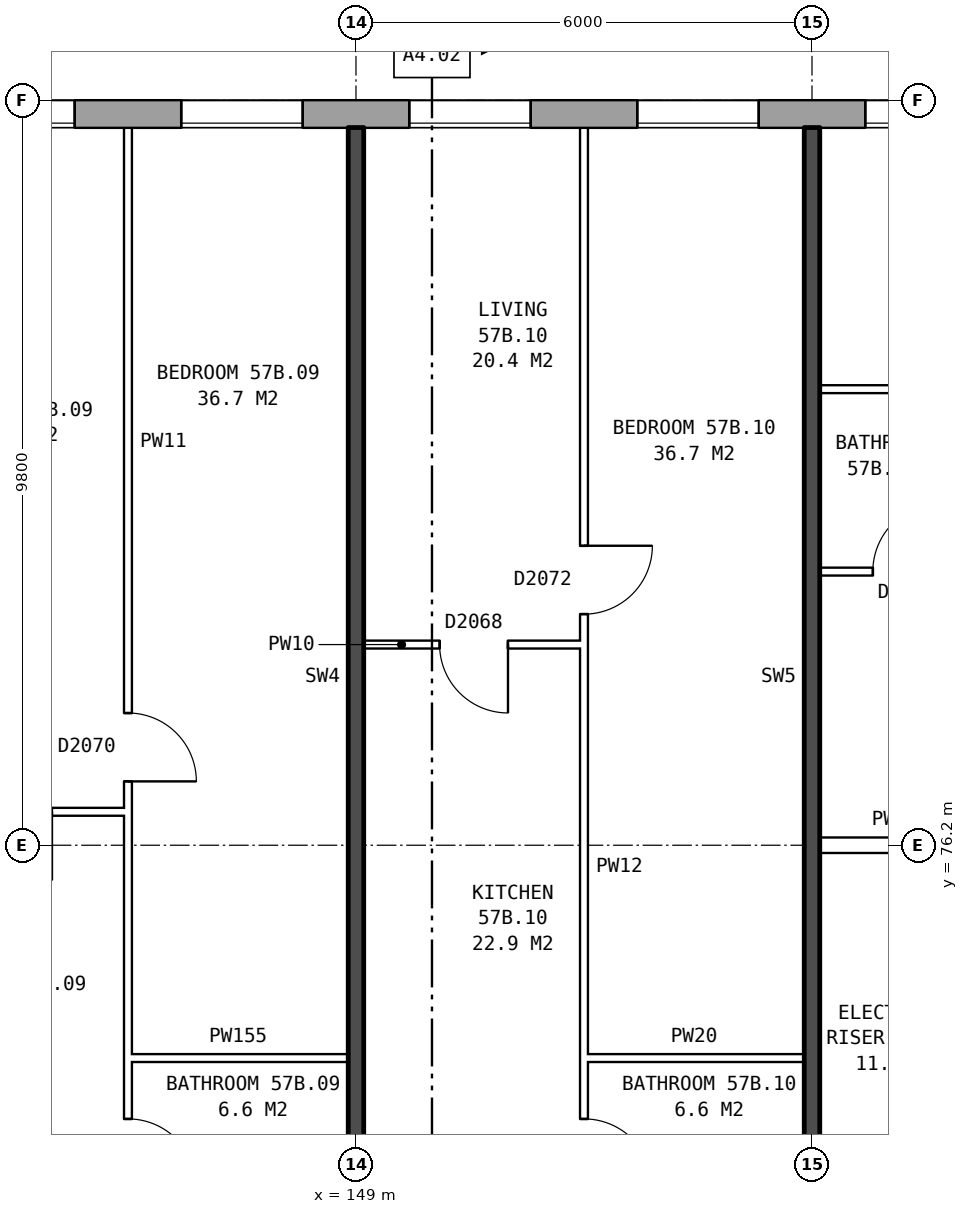
"""IFC4 building model, lengths in metres.
Left out: names, types, materials, properties, quantities, classifications, styles, units other than length and angle.
Written with IfcOpenShell. Run it as: python <this file> out.ifc"""

import sys

from ifc_helpers import new_model, si_unit, direction, frame, frame_2d, origin, place, context, subcontext, project, spatial, rectangle, extrude, element, fill, save


model = new_model("IFC4")
c1 = context("Model", 3, precision=1e-05, world=origin(), true_north=direction((0.0, 1.0)))
c2 = subcontext(c1, "Body", "Model", "MODEL_VIEW")
j1 = project(units=[si_unit("LENGTHUNIT", "METRE"), si_unit("PLANEANGLEUNIT", "RADIAN")], contexts=[c1])
p1 = place(None, origin())
s1 = spatial("IfcSite", under=j1, at=p1, CompositionType="ELEMENT")
p2 = place(p1, origin())
s2 = spatial("IfcBuilding", under=s1, at=p2, CompositionType="ELEMENT")
p3 = place(p2, frame((0.0, 0.0, 202.8)))
s3 = spatial("IfcBuildingStorey", under=s2, at=p3, CompositionType="ELEMENT", Elevation=202.8)
p4 = place(p3, frame((165.925, 85.82, 0.0), z_axis=(0.0, 0.0, 1.0), x_axis=(-1.0, 0.0, 0.0)))
e1 = element("IfcWall", 1, at=p4, inside=s3, PredefinedType="STANDARD", context=c2, shape_type="SweptSolid", body=[
    extrude(rectangle(XDim=33.875, YDim=0.36, at=frame_2d((16.938, 0.0))), origin(), (0.0, 0.0, 1.0), 2.85),
])
p5 = place(p4, frame((2.625, 0.0, 0.8)))
e2 = element("IfcOpeningElement", 2, at=p5, cuts=e1, PredefinedType="OPENING", context=c2, shape_type="SweptSolid", body=[
    extrude(rectangle(XDim=1.6, YDim=1.8, at=frame_2d((0.8, 0.9))), frame((0.0, 0.19, 0.0), z_axis=(0.0, -1.0, 0.0), x_axis=(1.0, 0.0, 0.0)), (0.0, 0.0, 1.0), 0.38),
])
p6 = place(p4, frame((5.625, 0.0, 0.8)))
e3 = element("IfcOpeningElement", 3, at=p6, cuts=e1, PredefinedType="OPENING", context=c2, shape_type="SweptSolid", body=[
    extrude(rectangle(XDim=1.6, YDim=1.8, at=frame_2d((0.8, 0.9))), frame((0.0, 0.19, 0.0), z_axis=(0.0, -1.0, 0.0), x_axis=(1.0, 0.0, 0.0)), (0.0, 0.0, 1.0), 0.38),
])
p7 = place(p4, frame((8.625, 0.0, 0.8)))
e4 = element("IfcOpeningElement", 4, at=p7, cuts=e1, PredefinedType="OPENING", context=c2, shape_type="SweptSolid", body=[
    extrude(rectangle(XDim=1.6, YDim=1.8, at=frame_2d((0.8, 0.9))), frame((0.0, 0.19, 0.0), z_axis=(0.0, -1.0, 0.0), x_axis=(1.0, 0.0, 0.0)), (0.0, 0.0, 1.0), 0.38),
])
p8 = place(p4, frame((11.625, 0.0, 0.8)))
e5 = element("IfcOpeningElement", 5, at=p8, cuts=e1, PredefinedType="OPENING", context=c2, shape_type="SweptSolid", body=[
    extrude(rectangle(XDim=1.6, YDim=1.8, at=frame_2d((0.8, 0.9))), frame((0.0, 0.19, 0.0), z_axis=(0.0, -1.0, 0.0), x_axis=(1.0, 0.0, 0.0)), (0.0, 0.0, 1.0), 0.38),
])
p9 = place(p4, frame((14.625, 0.0, 0.8)))
e6 = element("IfcOpeningElement", 6, at=p9, cuts=e1, PredefinedType="OPENING", context=c2, shape_type="SweptSolid", body=[
    extrude(rectangle(XDim=1.6, YDim=1.8, at=frame_2d((0.8, 0.9))), frame((0.0, 0.19, 0.0), z_axis=(0.0, -1.0, 0.0), x_axis=(1.0, 0.0, 0.0)), (0.0, 0.0, 1.0), 0.38),
])
p10 = place(p4, frame((17.625, 0.0, 0.8)))
e7 = element("IfcOpeningElement", 7, at=p10, cuts=e1, PredefinedType="OPENING", context=c2, shape_type="SweptSolid", body=[
    extrude(rectangle(XDim=1.6, YDim=1.8, at=frame_2d((0.8, 0.9))), frame((0.0, 0.19, 0.0), z_axis=(0.0, -1.0, 0.0), x_axis=(1.0, 0.0, 0.0)), (0.0, 0.0, 1.0), 0.38),
])
p11 = place(p4, frame((20.625, 0.0, 0.8)))
e8 = element("IfcOpeningElement", 8, at=p11, cuts=e1, PredefinedType="OPENING", context=c2, shape_type="SweptSolid", body=[
    extrude(rectangle(XDim=1.6, YDim=1.8, at=frame_2d((0.8, 0.9))), frame((0.0, 0.19, 0.0), z_axis=(0.0, -1.0, 0.0), x_axis=(1.0, 0.0, 0.0)), (0.0, 0.0, 1.0), 0.38),
])
p12 = place(p4, frame((23.625, 0.0, 0.8)))
e9 = element("IfcOpeningElement", 9, at=p12, cuts=e1, PredefinedType="OPENING", context=c2, shape_type="SweptSolid", body=[
    extrude(rectangle(XDim=1.6, YDim=1.8, at=frame_2d((0.8, 0.9))), frame((0.0, 0.19, 0.0), z_axis=(0.0, -1.0, 0.0), x_axis=(1.0, 0.0, 0.0)), (0.0, 0.0, 1.0), 0.38),
])
p13 = place(p4, frame((26.625, 0.0, 0.8)))
e10 = element("IfcOpeningElement", 10, at=p13, cuts=e1, PredefinedType="OPENING", context=c2, shape_type="SweptSolid", body=[
    extrude(rectangle(XDim=1.6, YDim=1.8, at=frame_2d((0.8, 0.9))), frame((0.0, 0.19, 0.0), z_axis=(0.0, -1.0, 0.0), x_axis=(1.0, 0.0, 0.0)), (0.0, 0.0, 1.0), 0.38),
])
p14 = place(p4, frame((29.625, 0.0, 0.8)))
e11 = element("IfcOpeningElement", 11, at=p14, cuts=e1, PredefinedType="OPENING", context=c2, shape_type="SweptSolid", body=[
    extrude(rectangle(XDim=1.6, YDim=1.8, at=frame_2d((0.8, 0.9))), frame((0.0, 0.19, 0.0), z_axis=(0.0, -1.0, 0.0), x_axis=(1.0, 0.0, 0.0)), (0.0, 0.0, 1.0), 0.38),
])
for number, where, z_axis, x_axis in (
    (12, (146.0, 73.4, 0.0), (0.0, 0.0, 1.0), (1.0, 0.0, 0.0)),
    (13, (152.0, 73.4, 0.0), (0.0, 0.0, 1.0), (1.0, 0.0, 0.0)),
):
    element("IfcWall", number, at=place(p3, frame(where, z_axis=z_axis, x_axis=x_axis)), inside=s3, PredefinedType="PARTITIONING", context=c2, shape_type="SweptSolid", body=[
        extrude(rectangle(XDim=2.9, YDim=0.1, at=frame_2d((1.45, 0.0))), origin(), (0.0, 0.0, 1.0), 2.85),
    ])
p15 = place(p3, frame((155.1, 76.2, 0.0), z_axis=(0.0, 0.0, 1.0), x_axis=(1.0, 0.0, 0.0)))
e14 = element("IfcWall", 14, at=p15, inside=s3, PredefinedType="PARTITIONING", context=c2, shape_type="SweptSolid", body=[
    extrude(rectangle(XDim=2.14, YDim=0.2, at=frame_2d((1.07, 0.0))), origin(), (0.0, 0.0, 1.0), 2.85),
])
p16 = place(p3, frame((143.1, 76.64, 0.0), z_axis=(0.0, 0.0, 1.0), x_axis=(1.0, 0.0, 0.0)))
e15 = element("IfcWall", 15, at=p16, inside=s3, PredefinedType="PARTITIONING", context=c2, shape_type="SweptSolid", body=[
    extrude(rectangle(XDim=2.9, YDim=0.1, at=frame_2d((1.45, 0.0))), origin(), (0.0, 0.0, 1.0), 2.85),
])
p17 = place(p16, frame((1.0, 0.0, 0.0)))
e16 = element("IfcOpeningElement", 16, at=p17, cuts=e15, PredefinedType="OPENING", context=c2, shape_type="SweptSolid", body=[
    extrude(rectangle(XDim=0.9, YDim=2.1, at=frame_2d((0.45, 1.05))), frame((0.0, 0.06, 0.0), z_axis=(0.0, -1.0, 0.0), x_axis=(1.0, 0.0, 0.0)), (0.0, 0.0, 1.0), 0.12),
])
p18 = place(p3, frame((149.1, 78.84, 0.0), z_axis=(0.0, 0.0, 1.0), x_axis=(1.0, 0.0, 0.0)))
e17 = element("IfcWall", 17, at=p18, inside=s3, PredefinedType="PARTITIONING", context=c2, shape_type="SweptSolid", body=[
    extrude(rectangle(XDim=2.9, YDim=0.1, at=frame_2d((1.45, 0.0))), origin(), (0.0, 0.0, 1.0), 2.85),
])
p19 = place(p18, frame((1.0, 0.0, 0.0)))
e18 = element("IfcOpeningElement", 18, at=p19, cuts=e17, PredefinedType="OPENING", context=c2, shape_type="SweptSolid", body=[
    extrude(rectangle(XDim=0.9, YDim=2.1, at=frame_2d((0.45, 1.05))), frame((0.0, 0.06, 0.0), z_axis=(0.0, -1.0, 0.0), x_axis=(1.0, 0.0, 0.0)), (0.0, 0.0, 1.0), 0.12),
])
p20 = place(p3, frame((155.1, 79.8, 0.0), z_axis=(0.0, 0.0, 1.0), x_axis=(1.0, 0.0, 0.0)))
e19 = element("IfcWall", 19, at=p20, inside=s3, PredefinedType="PARTITIONING", context=c2, shape_type="SweptSolid", body=[
    extrude(rectangle(XDim=5.8, YDim=0.1, at=frame_2d((2.9, 0.0))), origin(), (0.0, 0.0, 1.0), 2.85),
])
p21 = place(p20, frame((3.6, 0.0, 0.0)))
e20 = element("IfcOpeningElement", 20, at=p21, cuts=e19, PredefinedType="OPENING", context=c2, shape_type="SweptSolid", body=[
    extrude(rectangle(XDim=0.9, YDim=2.1, at=frame_2d((0.45, 1.05))), frame((0.0, 0.06, 0.0), z_axis=(0.0, -1.0, 0.0), x_axis=(1.0, 0.0, 0.0)), (0.0, 0.0, 1.0), 0.12),
])
p22 = place(p20, frame((0.7, 0.0, 0.0)))
e21 = element("IfcOpeningElement", 21, at=p22, cuts=e19, PredefinedType="OPENING", context=c2, shape_type="SweptSolid", body=[
    extrude(rectangle(XDim=0.9, YDim=2.1, at=frame_2d((0.45, 1.05))), frame((0.0, 0.06, 0.0), z_axis=(0.0, -1.0, 0.0), x_axis=(1.0, 0.0, 0.0)), (0.0, 0.0, 1.0), 0.12),
])
p23 = place(p3, frame((155.1, 82.2, 0.0), z_axis=(0.0, 0.0, 1.0), x_axis=(1.0, 0.0, 0.0)))
e22 = element("IfcWall", 22, at=p23, inside=s3, PredefinedType="PARTITIONING", context=c2, shape_type="SweptSolid", body=[
    extrude(rectangle(XDim=2.3, YDim=0.1, at=frame_2d((1.15, 0.0))), origin(), (0.0, 0.0, 1.0), 2.85),
])
p24 = place(p3, frame((146.0, 71.3, 0.0), z_axis=(0.0, 0.0, 1.0), x_axis=(0.0, 1.0, 0.0)))
e23 = element("IfcWall", 23, at=p24, inside=s3, PredefinedType="PARTITIONING", context=c2, shape_type="SweptSolid", body=[
    extrude(rectangle(XDim=14.34, YDim=0.1, at=frame_2d((7.17, 0.0))), origin(), (0.0, 0.0, 1.0), 2.85),
])
p25 = place(p24, frame((5.74, 0.0, 0.0)))
e24 = element("IfcOpeningElement", 24, at=p25, cuts=e23, PredefinedType="OPENING", context=c2, shape_type="SweptSolid", body=[
    extrude(rectangle(XDim=0.9, YDim=2.1, at=frame_2d((0.45, 1.05))), frame((0.0, 0.06, 0.0), z_axis=(0.0, -1.0, 0.0), x_axis=(1.0, 0.0, 0.0)), (0.0, 0.0, 1.0), 0.12),
])
p26 = place(p24, frame((0.4, 0.0, 0.0)))
e25 = element("IfcOpeningElement", 25, at=p26, cuts=e23, PredefinedType="OPENING", context=c2, shape_type="SweptSolid", body=[
    extrude(rectangle(XDim=0.9, YDim=2.1, at=frame_2d((0.45, 1.05))), frame((0.0, 0.06, 0.0), z_axis=(0.0, -1.0, 0.0), x_axis=(1.0, 0.0, 0.0)), (0.0, 0.0, 1.0), 0.12),
])
p27 = place(p3, frame((149.0, 71.2, 0.0), z_axis=(0.0, 0.0, 1.0), x_axis=(0.0, 1.0, 0.0)))
e26 = element("IfcWall", 26, at=p27, inside=s3, PredefinedType="SOLIDWALL", context=c2, shape_type="SweptSolid", body=[
    extrude(rectangle(XDim=14.44, YDim=0.2, at=frame_2d((7.22, 0.0))), origin(), (0.0, 0.0, 1.0), 2.85),
])
p28 = place(p3, frame((152.0, 71.3, 0.0), z_axis=(0.0, 0.0, 1.0), x_axis=(0.0, 1.0, 0.0)))
e27 = element("IfcWall", 27, at=p28, inside=s3, PredefinedType="PARTITIONING", context=c2, shape_type="SweptSolid", body=[
    extrude(rectangle(XDim=14.34, YDim=0.1, at=frame_2d((7.17, 0.0))), origin(), (0.0, 0.0, 1.0), 2.85),
])
p29 = place(p28, frame((7.94, 0.0, 0.0)))
e28 = element("IfcOpeningElement", 28, at=p29, cuts=e27, PredefinedType="OPENING", context=c2, shape_type="SweptSolid", body=[
    extrude(rectangle(XDim=0.9, YDim=2.1, at=frame_2d((0.45, 1.05))), frame((0.0, 0.06, 0.0), z_axis=(0.0, -1.0, 0.0), x_axis=(1.0, 0.0, 0.0)), (0.0, 0.0, 1.0), 0.12),
])
p30 = place(p28, frame((0.4, 0.0, 0.0)))
e29 = element("IfcOpeningElement", 29, at=p30, cuts=e27, PredefinedType="OPENING", context=c2, shape_type="SweptSolid", body=[
    extrude(rectangle(XDim=0.9, YDim=2.1, at=frame_2d((0.45, 1.05))), frame((0.0, 0.06, 0.0), z_axis=(0.0, -1.0, 0.0), x_axis=(1.0, 0.0, 0.0)), (0.0, 0.0, 1.0), 0.12),
])
p31 = place(p3, frame((155.0, 71.2, 0.0), z_axis=(0.0, 0.0, 1.0), x_axis=(0.0, 1.0, 0.0)))
e30 = element("IfcWall", 30, at=p31, inside=s3, PredefinedType="SOLIDWALL", context=c2, shape_type="SweptSolid", body=[
    extrude(rectangle(XDim=14.44, YDim=0.2, at=frame_2d((7.22, 0.0))), origin(), (0.0, 0.0, 1.0), 2.85),
])
p32 = place(p7, origin())
e31 = element("IfcWindow", 31, at=p32, inside=s3, PartitioningType="SINGLE_PANEL", PredefinedType="WINDOW", context=c2, shape_type="SweptSolid", body=[
    extrude(rectangle(XDim=1.6, YDim=1.8, at=frame_2d((0.8, 0.9))), frame((0.0, 0.15, 0.0), z_axis=(0.0, -1.0, 0.0), x_axis=(1.0, 0.0, 0.0)), (0.0, 0.0, 1.0), 0.06),
])
fill(e4, e31)
p33 = place(p8, origin())
e32 = element("IfcWindow", 32, at=p33, inside=s3, PartitioningType="SINGLE_PANEL", PredefinedType="WINDOW", context=c2, shape_type="SweptSolid", body=[
    extrude(rectangle(XDim=1.6, YDim=1.8, at=frame_2d((0.8, 0.9))), frame((0.0, 0.15, 0.0), z_axis=(0.0, -1.0, 0.0), x_axis=(1.0, 0.0, 0.0)), (0.0, 0.0, 1.0), 0.06),
])
fill(e5, e32)
p34 = place(p9, origin())
e33 = element("IfcWindow", 33, at=p34, inside=s3, PartitioningType="SINGLE_PANEL", PredefinedType="WINDOW", context=c2, shape_type="SweptSolid", body=[
    extrude(rectangle(XDim=1.6, YDim=1.8, at=frame_2d((0.8, 0.9))), frame((0.0, 0.15, 0.0), z_axis=(0.0, -1.0, 0.0), x_axis=(1.0, 0.0, 0.0)), (0.0, 0.0, 1.0), 0.06),
])
fill(e6, e33)
p35 = place(p10, origin())
e34 = element("IfcWindow", 34, at=p35, inside=s3, PartitioningType="SINGLE_PANEL", PredefinedType="WINDOW", context=c2, shape_type="SweptSolid", body=[
    extrude(rectangle(XDim=1.6, YDim=1.8, at=frame_2d((0.8, 0.9))), frame((0.0, 0.15, 0.0), z_axis=(0.0, -1.0, 0.0), x_axis=(1.0, 0.0, 0.0)), (0.0, 0.0, 1.0), 0.06),
])
fill(e7, e34)
p36 = place(p11, origin())
e35 = element("IfcWindow", 35, at=p36, inside=s3, PartitioningType="SINGLE_PANEL", PredefinedType="WINDOW", context=c2, shape_type="SweptSolid", body=[
    extrude(rectangle(XDim=1.6, YDim=1.8, at=frame_2d((0.8, 0.9))), frame((0.0, 0.15, 0.0), z_axis=(0.0, -1.0, 0.0), x_axis=(1.0, 0.0, 0.0)), (0.0, 0.0, 1.0), 0.06),
])
fill(e8, e35)
p37 = place(p22, origin())
e36 = element("IfcDoor", 36, at=p37, inside=s3, OperationType="SINGLE_SWING_RIGHT", PredefinedType="DOOR", context=c2, shape_type="SweptSolid", body=[
    extrude(rectangle(XDim=0.9, YDim=2.1, at=frame_2d((0.45, 1.05))), frame((0.0, 0.025, 0.0), z_axis=(0.0, -1.0, 0.0), x_axis=(1.0, 0.0, 0.0)), (0.0, 0.0, 1.0), 0.05),
])
fill(e21, e36)
p38 = place(p25, frame((0.9, 0.0, 0.0), z_axis=(0.0, 0.0, 1.0), x_axis=(-1.0, 0.0, 0.0)))
e37 = element("IfcDoor", 37, at=p38, inside=s3, OperationType="SINGLE_SWING_RIGHT", PredefinedType="DOOR", context=c2, shape_type="SweptSolid", body=[
    extrude(rectangle(XDim=0.9, YDim=2.1, at=frame_2d((0.45, 1.05))), frame((0.0, 0.025, 0.0), z_axis=(0.0, -1.0, 0.0), x_axis=(1.0, 0.0, 0.0)), (0.0, 0.0, 1.0), 0.05),
])
fill(e24, e37)
p39 = place(p26, frame((0.9, 0.0, 0.0), z_axis=(0.0, 0.0, 1.0), x_axis=(-1.0, 0.0, 0.0)))
e38 = element("IfcDoor", 38, at=p39, inside=s3, OperationType="SINGLE_SWING_RIGHT", PredefinedType="DOOR", context=c2, shape_type="SweptSolid", body=[
    extrude(rectangle(XDim=0.9, YDim=2.1, at=frame_2d((0.45, 1.05))), frame((0.0, 0.025, 0.0), z_axis=(0.0, -1.0, 0.0), x_axis=(1.0, 0.0, 0.0)), (0.0, 0.0, 1.0), 0.05),
])
fill(e25, e38)
p40 = place(p29, frame((0.9, 0.0, 0.0), z_axis=(0.0, 0.0, 1.0), x_axis=(-1.0, 0.0, 0.0)))
e39 = element("IfcDoor", 39, at=p40, inside=s3, OperationType="SINGLE_SWING_LEFT", PredefinedType="DOOR", context=c2, shape_type="SweptSolid", body=[
    extrude(rectangle(XDim=0.9, YDim=2.1, at=frame_2d((0.45, 1.05))), frame((0.0, 0.025, 0.0), z_axis=(0.0, -1.0, 0.0), x_axis=(1.0, 0.0, 0.0)), (0.0, 0.0, 1.0), 0.05),
])
fill(e28, e39)
p41 = place(p19, frame((0.9, 0.0, 0.0), z_axis=(0.0, 0.0, 1.0), x_axis=(-1.0, 0.0, 0.0)))
e40 = element("IfcDoor", 40, at=p41, inside=s3, OperationType="SINGLE_SWING_LEFT", PredefinedType="DOOR", context=c2, shape_type="SweptSolid", body=[
    extrude(rectangle(XDim=0.9, YDim=2.1, at=frame_2d((0.45, 1.05))), frame((0.0, 0.025, 0.0), z_axis=(0.0, -1.0, 0.0), x_axis=(1.0, 0.0, 0.0)), (0.0, 0.0, 1.0), 0.05),
])
fill(e18, e40)
p42 = place(p30, frame((0.9, 0.0, 0.0), z_axis=(0.0, 0.0, 1.0), x_axis=(-1.0, 0.0, 0.0)))
e41 = element("IfcDoor", 41, at=p42, inside=s3, OperationType="SINGLE_SWING_RIGHT", PredefinedType="DOOR", context=c2, shape_type="SweptSolid", body=[
    extrude(rectangle(XDim=0.9, YDim=2.1, at=frame_2d((0.45, 1.05))), frame((0.0, 0.025, 0.0), z_axis=(0.0, -1.0, 0.0), x_axis=(1.0, 0.0, 0.0)), (0.0, 0.0, 1.0), 0.05),
])
fill(e29, e41)
save(model, sys.argv[1])
